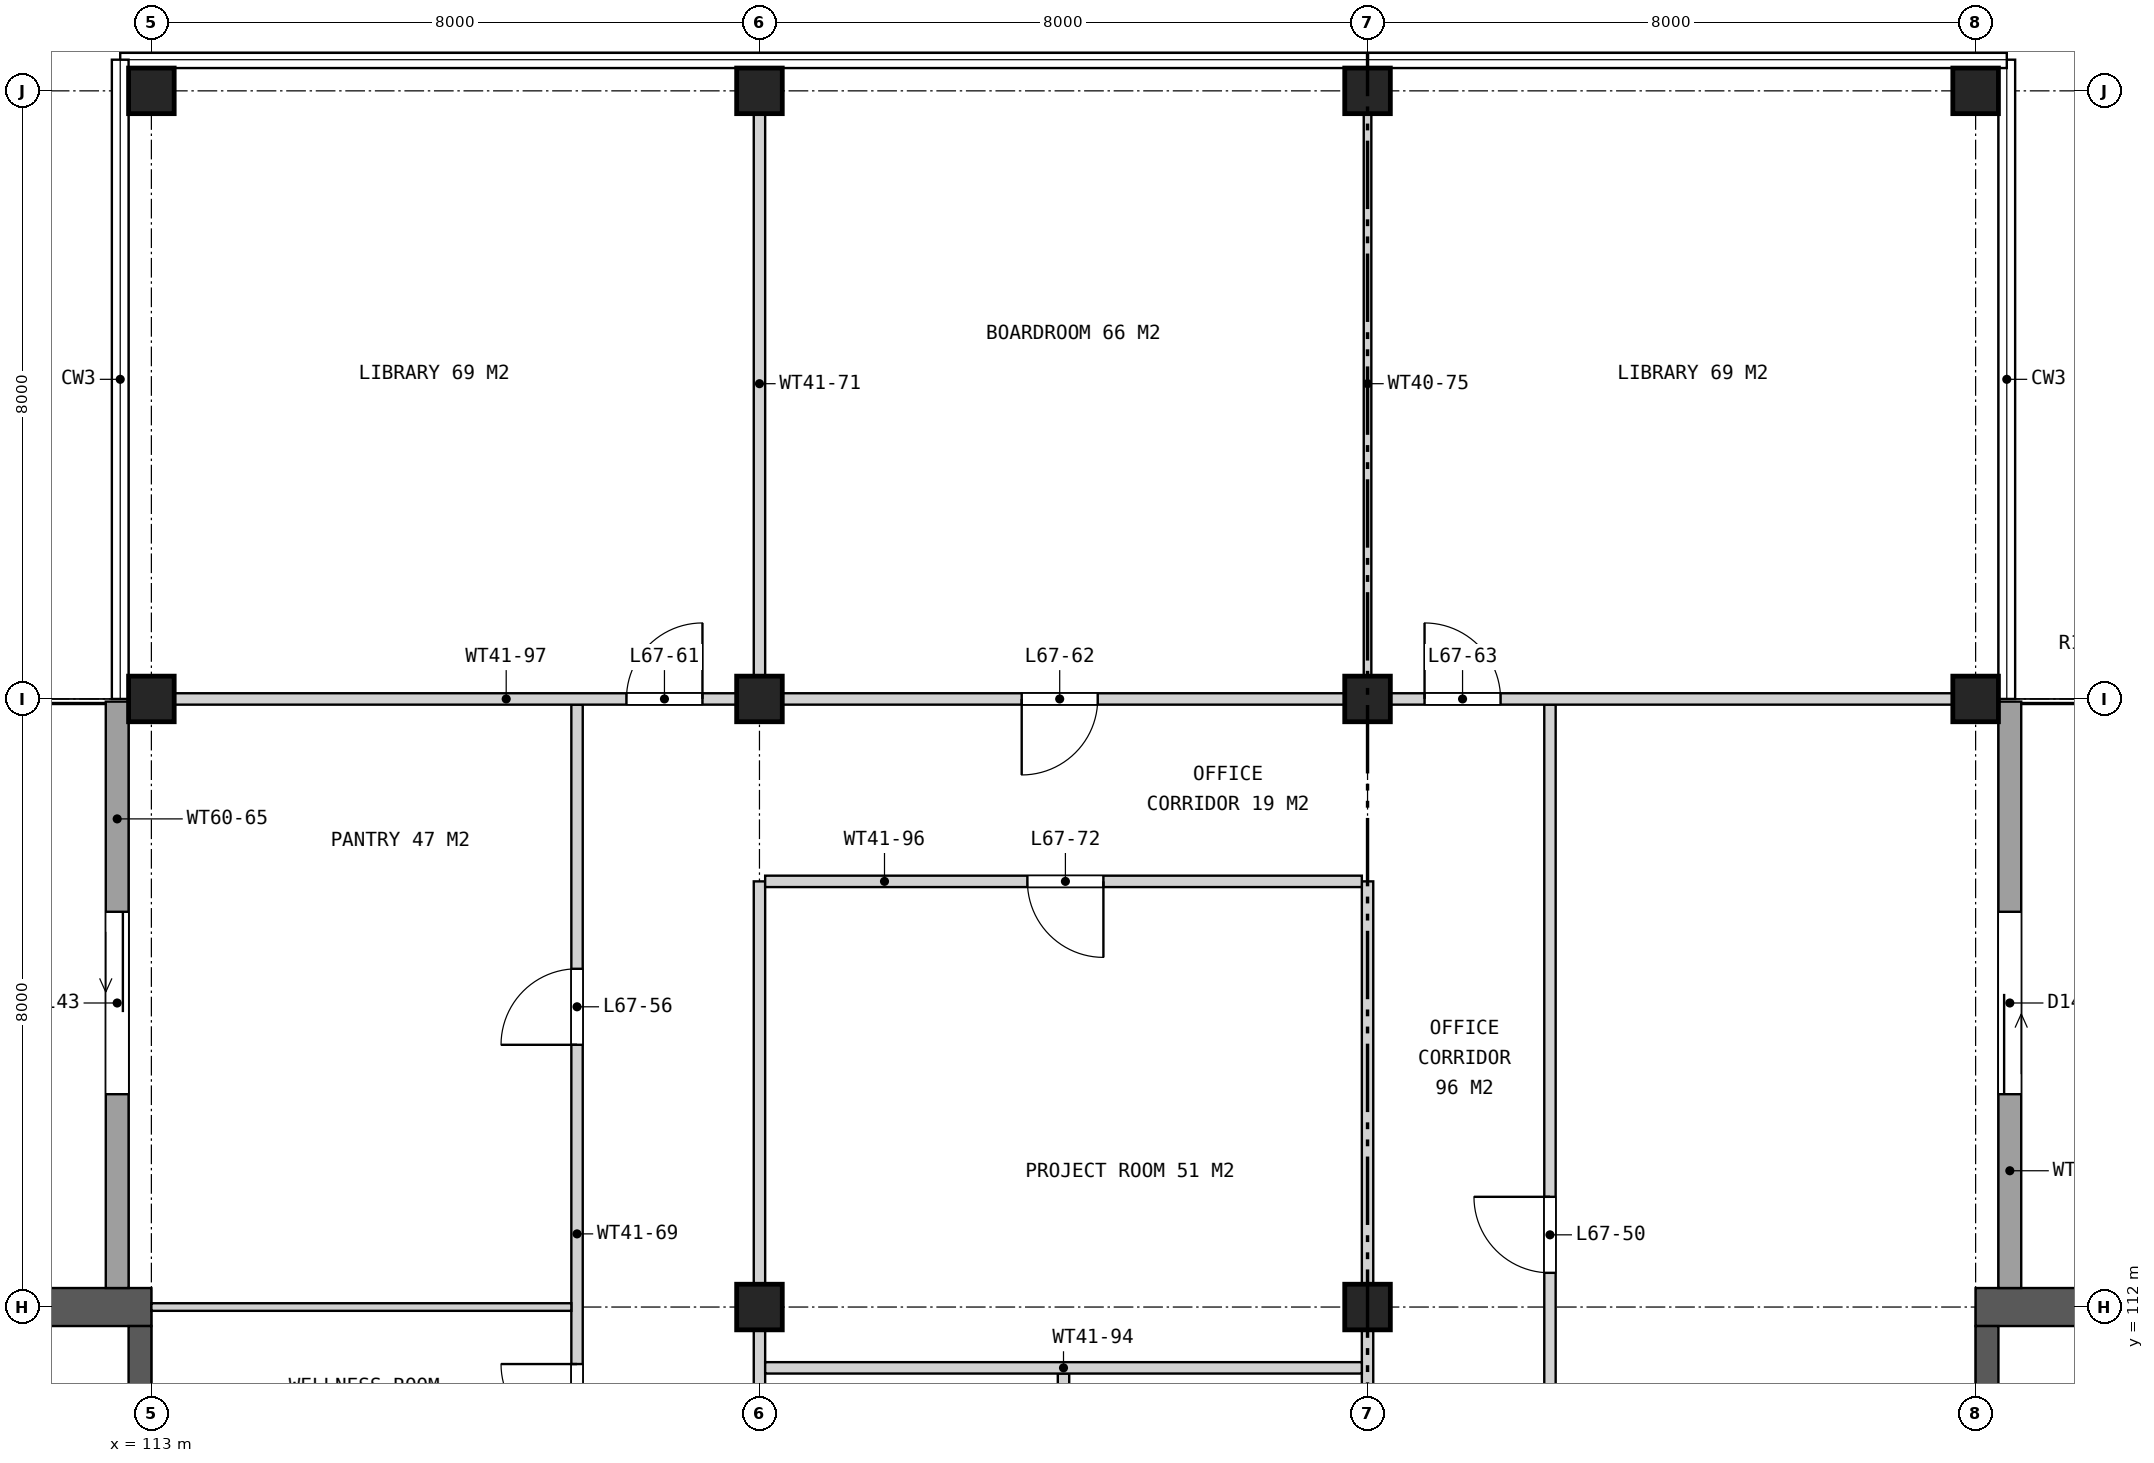
"""IFC4 building model, lengths in metres.
Left out: names, types, materials, properties, quantities, classifications, styles, units other than length and angle.
Written with IfcOpenShell. Run it as: python <this file> out.ifc"""

import sys

from ifc_helpers import new_model, si_unit, direction, frame, frame_2d, origin, origin_2d, place, context, subcontext, project, spatial, rectangle, extrude, element, fill, save


model = new_model("IFC4")
c1 = context("Model", 3, precision=1e-05, world=origin(), true_north=direction((0.0, 1.0)))
c2 = subcontext(c1, "Body", "Model", "MODEL_VIEW")
j1 = project(units=[si_unit("LENGTHUNIT", "METRE"), si_unit("PLANEANGLEUNIT", "RADIAN")], contexts=[c1])
p1 = place(None, origin())
s1 = spatial("IfcSite", under=j1, at=p1, CompositionType="ELEMENT")
p2 = place(p1, origin())
s2 = spatial("IfcBuilding", under=s1, at=p2, CompositionType="ELEMENT")
p3 = place(p2, frame((0.0, 0.0, 311.3)))
s3 = spatial("IfcBuildingStorey", under=s2, at=p3, CompositionType="ELEMENT", Elevation=311.3)
for number, where, z_axis, x_axis in (
    (1, (113.0, 120.0, 0.0), (0.0, 0.0, 1.0), (1.0, 0.0, 0.0)),
    (2, (113.0, 128.0, 0.0), (0.0, 0.0, 1.0), (1.0, 0.0, 0.0)),
    (3, (121.0, 112.0, 0.0), (0.0, 0.0, 1.0), (1.0, 0.0, 0.0)),
    (4, (121.0, 120.0, 0.0), (0.0, 0.0, 1.0), (1.0, 0.0, 0.0)),
    (5, (121.0, 128.0, 0.0), (0.0, 0.0, 1.0), (1.0, 0.0, 0.0)),
    (6, (129.0, 112.0, 0.0), (0.0, 0.0, 1.0), (1.0, 0.0, 0.0)),
    (7, (129.0, 120.0, 0.0), (0.0, 0.0, 1.0), (1.0, 0.0, 0.0)),
    (8, (129.0, 128.0, 0.0), (0.0, 0.0, 1.0), (1.0, 0.0, 0.0)),
    (9, (137.0, 120.0, 0.0), (0.0, 0.0, 1.0), (1.0, 0.0, 0.0)),
    (10, (137.0, 128.0, 0.0), (0.0, 0.0, 1.0), (1.0, 0.0, 0.0)),
):
    element("IfcColumn", number, at=place(p3, frame(where, z_axis=z_axis, x_axis=x_axis)), inside=s3, PredefinedType="COLUMN", context=c2, shape_type="SweptSolid", body=[
        extrude(rectangle(XDim=0.6, YDim=0.6, at=origin_2d()), origin(), (0.0, 0.0, 1.0), 4.2),
    ])
p4 = place(p3, frame((137.0, 112.0, 0.0), z_axis=(0.0, 0.0, 1.0), x_axis=(1.0, 0.0, 0.0)))
e11 = element("IfcWall", 11, at=p4, inside=s3, PredefinedType="SHEAR", context=c2, shape_type="SweptSolid", body=[
    extrude(rectangle(XDim=7.1, YDim=0.5, at=frame_2d((3.55, 0.0))), origin(), (0.0, 0.0, 1.0), 4.2),
])
p5 = place(p3, frame((137.15, 105.7, 0.0), z_axis=(0.0, 0.0, 1.0), x_axis=(0.0, 1.0, 0.0)))
e12 = element("IfcWall", 12, at=p5, inside=s3, PredefinedType="SHEAR", context=c2, shape_type="SweptSolid", body=[
    extrude(rectangle(XDim=6.05, YDim=0.3, at=frame_2d((3.025, 0.0))), origin(), (0.0, 0.0, 1.0), 4.2),
])
p6 = place(p3, frame((113.0, 112.0, 0.0), z_axis=(0.0, 0.0, 1.0), x_axis=(-1.0, 0.0, 0.0)))
e13 = element("IfcWall", 13, at=p6, inside=s3, PredefinedType="SHEAR", context=c2, shape_type="SweptSolid", body=[
    extrude(rectangle(XDim=7.1, YDim=0.5, at=frame_2d((3.55, 0.0))), origin(), (0.0, 0.0, 1.0), 4.2),
])
p7 = place(p3, frame((112.85, 111.75, 0.0), z_axis=(0.0, 0.0, 1.0), x_axis=(0.0, -1.0, 0.0)))
e14 = element("IfcWall", 14, at=p7, inside=s3, PredefinedType="SHEAR", context=c2, shape_type="SweptSolid", body=[
    extrude(rectangle(XDim=6.05, YDim=0.3, at=frame_2d((3.025, 0.0))), origin(), (0.0, 0.0, 1.0), 4.2),
])
p8 = place(p3, frame((137.45, 112.25, 0.0), z_axis=(0.0, 0.0, 1.0), x_axis=(0.0, 1.0, 0.0)))
e15 = element("IfcWall", 15, at=p8, inside=s3, PredefinedType="SOLIDWALL", context=c2, shape_type="SweptSolid", body=[
    extrude(rectangle(XDim=7.715, YDim=0.3, at=frame_2d((3.857, 0.0))), origin(), (0.0, 0.0, 1.0), 3.544),
])
p9 = place(p8, frame((2.55, 0.0, 0.0)))
e16 = element("IfcOpeningElement", 16, at=p9, cuts=e15, PredefinedType="OPENING", context=c2, shape_type="SweptSolid", body=[
    extrude(rectangle(XDim=2.4, YDim=2.4, at=frame_2d((1.2, 1.2))), frame((0.0, 0.16, 0.0), z_axis=(0.0, -1.0, 0.0), x_axis=(1.0, 0.0, 0.0)), (0.0, 0.0, 1.0), 0.32),
])
p10 = place(p3, frame((112.55, 119.965, 0.0), z_axis=(0.0, 0.0, 1.0), x_axis=(0.0, -1.0, 0.0)))
e17 = element("IfcWall", 17, at=p10, inside=s3, PredefinedType="SOLIDWALL", context=c2, shape_type="SweptSolid", body=[
    extrude(rectangle(XDim=7.715, YDim=0.3, at=frame_2d((3.857, 0.0))), origin(), (0.0, 0.0, 1.0), 3.544),
])
p11 = place(p10, frame((2.765, 0.0, 0.0)))
e18 = element("IfcOpeningElement", 18, at=p11, cuts=e17, PredefinedType="OPENING", context=c2, shape_type="SweptSolid", body=[
    extrude(rectangle(XDim=2.4, YDim=2.4, at=frame_2d((1.2, 1.2))), frame((0.0, 0.16, 0.0), z_axis=(0.0, -1.0, 0.0), x_axis=(1.0, 0.0, 0.0)), (0.0, 0.0, 1.0), 0.32),
])
p12 = place(p3, frame((118.6, 106.0, 0.0), z_axis=(0.0, 0.0, 1.0), x_axis=(0.0, 1.0, 0.0)))
e19 = element("IfcWall", 19, at=p12, inside=s3, PredefinedType="PARTITIONING", context=c2, shape_type="SweptSolid", body=[
    extrude(rectangle(XDim=13.925, YDim=0.15, at=frame_2d((6.962, 0.0))), origin(), (0.0, 0.0, 1.0), 3.443),
])
p13 = place(p12, frame((1.25, 0.0, 0.0)))
e20 = element("IfcOpeningElement", 20, at=p13, cuts=e19, PredefinedType="OPENING", context=c2, shape_type="SweptSolid", body=[
    extrude(rectangle(XDim=1.0, YDim=2.1, at=frame_2d((0.5, 1.05))), frame((0.0, 0.085, 0.0), z_axis=(0.0, -1.0, 0.0), x_axis=(1.0, 0.0, 0.0)), (0.0, 0.0, 1.0), 0.17),
])
p14 = place(p12, frame((4.25, 0.0, 0.0)))
e21 = element("IfcOpeningElement", 21, at=p14, cuts=e19, PredefinedType="OPENING", context=c2, shape_type="SweptSolid", body=[
    extrude(rectangle(XDim=1.0, YDim=2.1, at=frame_2d((0.5, 1.05))), frame((0.0, 0.085, 0.0), z_axis=(0.0, -1.0, 0.0), x_axis=(1.0, 0.0, 0.0)), (0.0, 0.0, 1.0), 0.17),
])
p15 = place(p12, frame((9.45, 0.0, 0.0)))
e22 = element("IfcOpeningElement", 22, at=p15, cuts=e19, PredefinedType="OPENING", context=c2, shape_type="SweptSolid", body=[
    extrude(rectangle(XDim=1.0, YDim=2.1, at=frame_2d((0.5, 1.05))), frame((0.0, 0.085, 0.0), z_axis=(0.0, -1.0, 0.0), x_axis=(1.0, 0.0, 0.0)), (0.0, 0.0, 1.0), 0.17),
])
p16 = place(p3, frame((121.0, 82.4, 0.0), z_axis=(0.0, 0.0, 1.0), x_axis=(0.0, 1.0, 0.0)))
e23 = element("IfcWall", 23, at=p16, inside=s3, PredefinedType="PARTITIONING", context=c2, shape_type="SweptSolid", body=[
    extrude(rectangle(XDim=35.2, YDim=0.15, at=frame_2d((17.6, 0.0))), origin(), (0.0, 0.0, 1.0), 3.443),
])
p17 = place(p16, frame((8.25, 0.0, 0.0)))
e24 = element("IfcOpeningElement", 24, at=p17, cuts=e23, PredefinedType="OPENING", context=c2, shape_type="SweptSolid", body=[
    extrude(rectangle(XDim=1.0, YDim=2.1, at=frame_2d((0.5, 1.05))), frame((0.0, 0.085, 0.0), z_axis=(0.0, -1.0, 0.0), x_axis=(1.0, 0.0, 0.0)), (0.0, 0.0, 1.0), 0.17),
])
p18 = place(p16, frame((22.15, 0.0, 0.0)))
e25 = element("IfcOpeningElement", 25, at=p18, cuts=e23, PredefinedType="OPENING", context=c2, shape_type="SweptSolid", body=[
    extrude(rectangle(XDim=1.0, YDim=2.1, at=frame_2d((0.5, 1.05))), frame((0.0, 0.085, 0.0), z_axis=(0.0, -1.0, 0.0), x_axis=(1.0, 0.0, 0.0)), (0.0, 0.0, 1.0), 0.17),
])
p19 = place(p16, frame((26.35, 0.0, 0.0)))
e26 = element("IfcOpeningElement", 26, at=p19, cuts=e23, PredefinedType="OPENING", context=c2, shape_type="SweptSolid", body=[
    extrude(rectangle(XDim=1.0, YDim=2.1, at=frame_2d((0.5, 1.05))), frame((0.0, 0.085, 0.0), z_axis=(0.0, -1.0, 0.0), x_axis=(1.0, 0.0, 0.0)), (0.0, 0.0, 1.0), 0.17),
])
p20 = place(p3, frame((121.0, 120.075, 0.0), z_axis=(0.0, 0.0, 1.0), x_axis=(0.0, 1.0, 0.0)))
e27 = element("IfcWall", 27, at=p20, inside=s3, PredefinedType="PARTITIONING", context=c2, shape_type="SweptSolid", body=[
    extrude(rectangle(XDim=8.145, YDim=0.15, at=frame_2d((4.073, 0.0))), origin(), (0.0, 0.0, 1.0), 3.443),
])
p21 = place(p3, frame((125.0, 107.275, 0.0), z_axis=(0.0, 0.0, 1.0), x_axis=(0.0, 1.0, 0.0)))
e28 = element("IfcWall", 28, at=p21, inside=s3, PredefinedType="PARTITIONING", context=c2, shape_type="SweptSolid", body=[
    extrude(rectangle(XDim=3.85, YDim=0.15, at=frame_2d((1.925, 0.0))), origin(), (0.0, 0.0, 1.0), 3.443),
])
p22 = place(p3, frame((129.0, 82.4, 0.0), z_axis=(0.0, 0.0, 1.0), x_axis=(0.0, 1.0, 0.0)))
e29 = element("IfcWall", 29, at=p22, inside=s3, PredefinedType="PARTITIONING", context=c2, shape_type="SweptSolid", body=[
    extrude(rectangle(XDim=35.2, YDim=0.15, at=frame_2d((17.6, 0.0))), origin(), (0.0, 0.0, 1.0), 3.443),
])
p23 = place(p22, frame((8.25, 0.0, 0.0)))
e30 = element("IfcOpeningElement", 30, at=p23, cuts=e29, PredefinedType="OPENING", context=c2, shape_type="SweptSolid", body=[
    extrude(rectangle(XDim=1.0, YDim=2.1, at=frame_2d((0.5, 1.05))), frame((0.0, 0.085, 0.0), z_axis=(0.0, -1.0, 0.0), x_axis=(1.0, 0.0, 0.0)), (0.0, 0.0, 1.0), 0.17),
])
p24 = place(p22, frame((15.85, 0.0, 0.0)))
e31 = element("IfcOpeningElement", 31, at=p24, cuts=e29, PredefinedType="OPENING", context=c2, shape_type="SweptSolid", body=[
    extrude(rectangle(XDim=1.0, YDim=2.1, at=frame_2d((0.5, 1.05))), frame((0.0, 0.085, 0.0), z_axis=(0.0, -1.0, 0.0), x_axis=(1.0, 0.0, 0.0)), (0.0, 0.0, 1.0), 0.17),
])
p25 = place(p22, frame((26.35, 0.0, 0.0)))
e32 = element("IfcOpeningElement", 32, at=p25, cuts=e29, PredefinedType="OPENING", context=c2, shape_type="SweptSolid", body=[
    extrude(rectangle(XDim=1.0, YDim=2.1, at=frame_2d((0.5, 1.05))), frame((0.0, 0.085, 0.0), z_axis=(0.0, -1.0, 0.0), x_axis=(1.0, 0.0, 0.0)), (0.0, 0.0, 1.0), 0.17),
])
p26 = place(p3, frame((129.0, 120.075, 0.0), z_axis=(0.0, 0.0, 1.0), x_axis=(0.0, 1.0, 0.0)))
e33 = element("IfcWall", 33, at=p26, inside=s3, PredefinedType="PARTITIONING", context=c2, shape_type="SweptSolid", body=[
    extrude(rectangle(XDim=8.145, YDim=0.1, at=frame_2d((4.073, 0.0))), origin(), (0.0, 0.0, 1.0), 3.443),
])
p27 = place(p3, frame((131.4, 106.0, 0.0), z_axis=(0.0, 0.0, 1.0), x_axis=(0.0, 1.0, 0.0)))
e34 = element("IfcWall", 34, at=p27, inside=s3, PredefinedType="PARTITIONING", context=c2, shape_type="SweptSolid", body=[
    extrude(rectangle(XDim=13.925, YDim=0.15, at=frame_2d((6.962, 0.0))), origin(), (0.0, 0.0, 1.0), 3.443),
])
p28 = place(p27, frame((6.45, 0.0, 0.0)))
e35 = element("IfcOpeningElement", 35, at=p28, cuts=e34, PredefinedType="OPENING", context=c2, shape_type="SweptSolid", body=[
    extrude(rectangle(XDim=1.0, YDim=2.1, at=frame_2d((0.5, 1.05))), frame((0.0, 0.085, 0.0), z_axis=(0.0, -1.0, 0.0), x_axis=(1.0, 0.0, 0.0)), (0.0, 0.0, 1.0), 0.17),
])
p29 = place(p3, frame((121.075, 111.2, 0.0), z_axis=(0.0, 0.0, 1.0), x_axis=(1.0, 0.0, 0.0)))
e36 = element("IfcWall", 36, at=p29, inside=s3, PredefinedType="PARTITIONING", context=c2, shape_type="SweptSolid", body=[
    extrude(rectangle(XDim=7.85, YDim=0.15, at=frame_2d((3.925, 0.0))), origin(), (0.0, 0.0, 1.0), 3.443),
])
p30 = place(p3, frame((113.0, 112.0, 0.0), z_axis=(0.0, 0.0, 1.0), x_axis=(1.0, 0.0, 0.0)))
e37 = element("IfcWall", 37, at=p30, inside=s3, PredefinedType="PARTITIONING", context=c2, shape_type="SweptSolid", body=[
    extrude(rectangle(XDim=5.525, YDim=0.1, at=frame_2d((2.762, 0.0))), origin(), (0.0, 0.0, 1.0), 3.443),
])
p31 = place(p3, frame((121.075, 117.6, 0.0), z_axis=(0.0, 0.0, 1.0), x_axis=(1.0, 0.0, 0.0)))
e38 = element("IfcWall", 38, at=p31, inside=s3, PredefinedType="PARTITIONING", context=c2, shape_type="SweptSolid", body=[
    extrude(rectangle(XDim=7.85, YDim=0.15, at=frame_2d((3.925, 0.0))), origin(), (0.0, 0.0, 1.0), 3.443),
])
p32 = place(p31, frame((3.45, 0.0, 0.0)))
e39 = element("IfcOpeningElement", 39, at=p32, cuts=e38, PredefinedType="OPENING", context=c2, shape_type="SweptSolid", body=[
    extrude(rectangle(XDim=1.0, YDim=2.1, at=frame_2d((0.5, 1.05))), frame((0.0, 0.085, 0.0), z_axis=(0.0, -1.0, 0.0), x_axis=(1.0, 0.0, 0.0)), (0.0, 0.0, 1.0), 0.17),
])
p33 = place(p3, frame((112.78, 120.0, 0.0), z_axis=(0.0, 0.0, 1.0), x_axis=(1.0, 0.0, 0.0)))
e40 = element("IfcWall", 40, at=p33, inside=s3, PredefinedType="PARTITIONING", context=c2, shape_type="SweptSolid", body=[
    extrude(rectangle(XDim=24.44, YDim=0.15, at=frame_2d((12.22, 0.0))), origin(), (0.0, 0.0, 1.0), 3.443),
])
p34 = place(p33, frame((6.47, 0.0, 0.0)))
e41 = element("IfcOpeningElement", 41, at=p34, cuts=e40, PredefinedType="OPENING", context=c2, shape_type="SweptSolid", body=[
    extrude(rectangle(XDim=1.0, YDim=2.1, at=frame_2d((0.5, 1.05))), frame((0.0, 0.085, 0.0), z_axis=(0.0, -1.0, 0.0), x_axis=(1.0, 0.0, 0.0)), (0.0, 0.0, 1.0), 0.17),
])
p35 = place(p33, frame((11.67, 0.0, 0.0)))
e42 = element("IfcOpeningElement", 42, at=p35, cuts=e40, PredefinedType="OPENING", context=c2, shape_type="SweptSolid", body=[
    extrude(rectangle(XDim=1.0, YDim=2.1, at=frame_2d((0.5, 1.05))), frame((0.0, 0.085, 0.0), z_axis=(0.0, -1.0, 0.0), x_axis=(1.0, 0.0, 0.0)), (0.0, 0.0, 1.0), 0.17),
])
p36 = place(p33, frame((16.97, 0.0, 0.0)))
e43 = element("IfcOpeningElement", 43, at=p36, cuts=e40, PredefinedType="OPENING", context=c2, shape_type="SweptSolid", body=[
    extrude(rectangle(XDim=1.0, YDim=2.1, at=frame_2d((0.5, 1.05))), frame((0.0, 0.085, 0.0), z_axis=(0.0, -1.0, 0.0), x_axis=(1.0, 0.0, 0.0)), (0.0, 0.0, 1.0), 0.17),
])
p37 = place(p9, frame((2.4, 0.0, 0.0), z_axis=(0.0, 0.0, 1.0), x_axis=(-1.0, 0.0, 0.0)))
e44 = element("IfcDoor", 44, at=p37, inside=s3, OperationType="SLIDING_TO_LEFT", PredefinedType="DOOR", context=c2, shape_type="SweptSolid", body=[
    extrude(rectangle(XDim=2.4, YDim=2.4, at=frame_2d((1.2, 1.2))), frame((0.0, 0.025, 0.0), z_axis=(0.0, -1.0, 0.0), x_axis=(1.0, 0.0, 0.0)), (0.0, 0.0, 1.0), 0.05),
])
fill(e16, e44)
p38 = place(p11, frame((2.4, 0.0, 0.0), z_axis=(0.0, 0.0, 1.0), x_axis=(-1.0, 0.0, 0.0)))
e45 = element("IfcDoor", 45, at=p38, inside=s3, OperationType="SLIDING_TO_LEFT", PredefinedType="DOOR", context=c2, shape_type="SweptSolid", body=[
    extrude(rectangle(XDim=2.4, YDim=2.4, at=frame_2d((1.2, 1.2))), frame((0.0, 0.025, 0.0), z_axis=(0.0, -1.0, 0.0), x_axis=(1.0, 0.0, 0.0)), (0.0, 0.0, 1.0), 0.05),
])
fill(e18, e45)
p39 = place(p28, origin())
e46 = element("IfcDoor", 46, at=p39, inside=s3, OperationType="SINGLE_SWING_RIGHT", PredefinedType="DOOR", context=c2, shape_type="SweptSolid", body=[
    extrude(rectangle(XDim=1.0, YDim=2.1, at=frame_2d((0.5, 1.05))), frame((0.0, 0.025, 0.0), z_axis=(0.0, -1.0, 0.0), x_axis=(1.0, 0.0, 0.0)), (0.0, 0.0, 1.0), 0.05),
])
fill(e35, e46)
p40 = place(p14, origin())
e47 = element("IfcDoor", 47, at=p40, inside=s3, OperationType="SINGLE_SWING_RIGHT", PredefinedType="DOOR", context=c2, shape_type="SweptSolid", body=[
    extrude(rectangle(XDim=1.0, YDim=2.1, at=frame_2d((0.5, 1.05))), frame((0.0, 0.025, 0.0), z_axis=(0.0, -1.0, 0.0), x_axis=(1.0, 0.0, 0.0)), (0.0, 0.0, 1.0), 0.05),
])
fill(e21, e47)
p41 = place(p15, origin())
e48 = element("IfcDoor", 48, at=p41, inside=s3, OperationType="SINGLE_SWING_LEFT", PredefinedType="DOOR", context=c2, shape_type="SweptSolid", body=[
    extrude(rectangle(XDim=1.0, YDim=2.1, at=frame_2d((0.5, 1.05))), frame((0.0, 0.025, 0.0), z_axis=(0.0, -1.0, 0.0), x_axis=(1.0, 0.0, 0.0)), (0.0, 0.0, 1.0), 0.05),
])
fill(e22, e48)
p42 = place(p34, origin())
e49 = element("IfcDoor", 49, at=p42, inside=s3, OperationType="SINGLE_SWING_RIGHT", PredefinedType="DOOR", context=c2, shape_type="SweptSolid", body=[
    extrude(rectangle(XDim=1.0, YDim=2.1, at=frame_2d((0.5, 1.05))), frame((0.0, 0.025, 0.0), z_axis=(0.0, -1.0, 0.0), x_axis=(1.0, 0.0, 0.0)), (0.0, 0.0, 1.0), 0.05),
])
fill(e41, e49)
p43 = place(p35, frame((1.0, 0.0, 0.0), z_axis=(0.0, 0.0, 1.0), x_axis=(-1.0, 0.0, 0.0)))
e50 = element("IfcDoor", 50, at=p43, inside=s3, OperationType="SINGLE_SWING_RIGHT", PredefinedType="DOOR", context=c2, shape_type="SweptSolid", body=[
    extrude(rectangle(XDim=1.0, YDim=2.1, at=frame_2d((0.5, 1.05))), frame((0.0, 0.025, 0.0), z_axis=(0.0, -1.0, 0.0), x_axis=(1.0, 0.0, 0.0)), (0.0, 0.0, 1.0), 0.05),
])
fill(e42, e50)
p44 = place(p36, origin())
e51 = element("IfcDoor", 51, at=p44, inside=s3, OperationType="SINGLE_SWING_LEFT", PredefinedType="DOOR", context=c2, shape_type="SweptSolid", body=[
    extrude(rectangle(XDim=1.0, YDim=2.1, at=frame_2d((0.5, 1.05))), frame((0.0, 0.025, 0.0), z_axis=(0.0, -1.0, 0.0), x_axis=(1.0, 0.0, 0.0)), (0.0, 0.0, 1.0), 0.05),
])
fill(e43, e51)
p45 = place(p32, frame((1.0, 0.0, 0.0), z_axis=(0.0, 0.0, 1.0), x_axis=(-1.0, 0.0, 0.0)))
e52 = element("IfcDoor", 52, at=p45, inside=s3, OperationType="SINGLE_SWING_LEFT", PredefinedType="DOOR", context=c2, shape_type="SweptSolid", body=[
    extrude(rectangle(XDim=1.0, YDim=2.1, at=frame_2d((0.5, 1.05))), frame((0.0, 0.025, 0.0), z_axis=(0.0, -1.0, 0.0), x_axis=(1.0, 0.0, 0.0)), (0.0, 0.0, 1.0), 0.05),
])
fill(e39, e52)
save(model, sys.argv[1])
